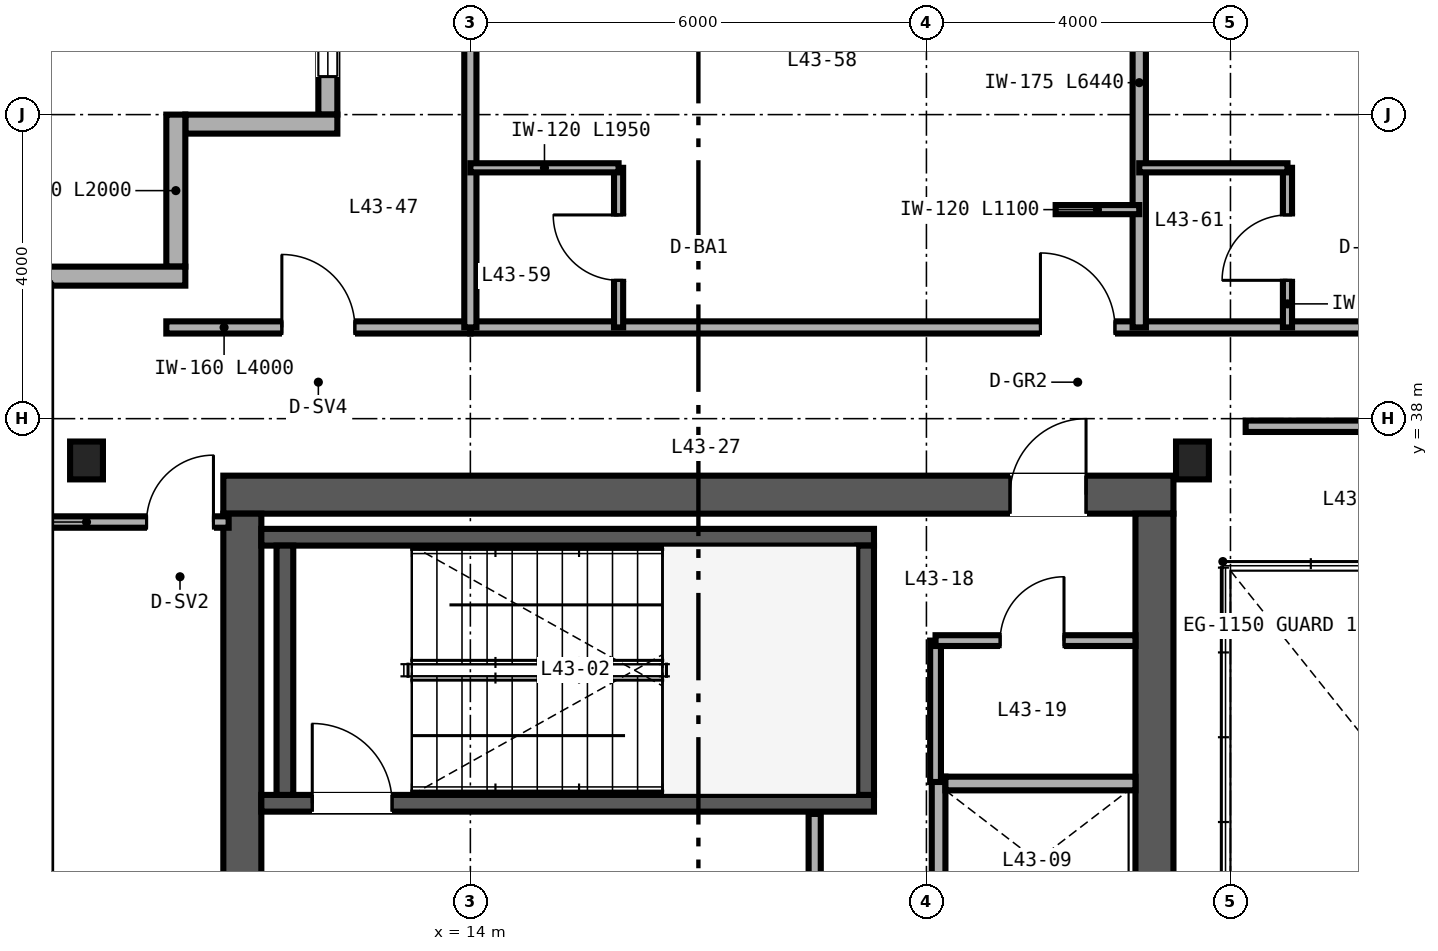
"""IFC4 building model, lengths in metres.
Left out: names, types, materials, properties, quantities, classifications, styles, units other than length and angle.
Written with IfcOpenShell. Run it as: python <this file> out.ifc"""

import sys

from ifc_helpers import new_model, si_unit, direction, frame, frame_2d, origin, origin_2d, place, context, subcontext, project, spatial, rectangle, i_section, extrude, source, transform, mapped, element, fill, save


model = new_model("IFC4")
c1 = context("Model", 3, precision=1e-05, world=origin(), true_north=direction((0.0, 1.0)))
c2 = subcontext(c1, "Body", "Model", "MODEL_VIEW")
j1 = project(units=[si_unit("LENGTHUNIT", "METRE"), si_unit("PLANEANGLEUNIT", "RADIAN")], contexts=[c1])
p1 = place(None, origin())
s1 = spatial("IfcSite", under=j1, at=p1, CompositionType="ELEMENT")
p2 = place(p1, origin())
s2 = spatial("IfcBuilding", under=s1, at=p2, CompositionType="ELEMENT")
p3 = place(p2, frame((0.0, 0.0, 174.0)))
s3 = spatial("IfcBuildingStorey", under=s2, at=p3, CompositionType="ELEMENT", Elevation=174.0)
p4 = place(p3, frame((10.75, 37.0, 0.0), z_axis=(0.0, 0.0, 1.0), x_axis=(1.0, 0.0, 0.0)))
e1 = element("IfcWall", 1, at=p4, inside=s3, PredefinedType="SHEAR", context=c2, shape_type="SweptSolid", body=[
    extrude(rectangle(XDim=12.5, YDim=0.5, at=frame_2d((6.25, 0.0))), origin(), (0.0, 0.0, 1.0), 3.37),
])
p5 = place(p4, frame((10.35, 0.0, 0.0)))
e2 = element("IfcOpeningElement", 2, at=p5, cuts=e1, PredefinedType="OPENING", context=c2, shape_type="SweptSolid", body=[
    extrude(rectangle(XDim=1.0, YDim=2.15, at=frame_2d((0.5, 1.075))), frame((0.0, 0.26, 0.0), z_axis=(0.0, -1.0, 0.0), x_axis=(1.0, 0.0, 0.0)), (0.0, 0.0, 1.0), 0.52),
])
for number, where, z_axis, x_axis in (
    (3, (11.0, 15.25, 0.0), (0.0, 0.0, 1.0), (0.0, 1.0, 0.0)),
    (4, (23.0, 15.25, 0.0), (0.0, 0.0, 1.0), (0.0, 1.0, 0.0)),
):
    element("IfcWall", number, at=place(p3, frame(where, z_axis=z_axis, x_axis=x_axis)), inside=s3, PredefinedType="SHEAR", context=c2, shape_type="SweptSolid", body=[
        extrude(rectangle(XDim=21.5, YDim=0.5, at=frame_2d((10.75, 0.0))), origin(), (0.0, 0.0, 1.0), 3.37),
    ])
p6 = place(p3, frame((11.25, 32.94, 0.0), z_axis=(0.0, 0.0, 1.0), x_axis=(1.0, 0.0, 0.0)))
e5 = element("IfcWall", 5, at=p6, inside=s3, PredefinedType="SHEAR", context=c2, shape_type="SweptSolid", body=[
    extrude(rectangle(XDim=8.06, YDim=0.22, at=frame_2d((4.03, 0.0))), origin(), (0.0, 0.0, 1.0), 3.4),
])
p7 = place(p6, frame((0.67, 0.0, 0.0)))
e6 = element("IfcOpeningElement", 6, at=p7, cuts=e5, PredefinedType="OPENING", context=c2, shape_type="SweptSolid", body=[
    extrude(rectangle(XDim=1.05, YDim=2.15, at=frame_2d((0.525, 1.075))), frame((0.0, 0.12, 0.0), z_axis=(0.0, -1.0, 0.0), x_axis=(1.0, 0.0, 0.0)), (0.0, 0.0, 1.0), 0.24),
])
p8 = place(p3, frame((11.25, 36.44, 0.0), z_axis=(0.0, 0.0, 1.0), x_axis=(1.0, 0.0, 0.0)))
e7 = element("IfcWall", 7, at=p8, inside=s3, PredefinedType="SHEAR", context=c2, shape_type="SweptSolid", body=[
    extrude(rectangle(XDim=8.06, YDim=0.22, at=frame_2d((4.03, 0.0))), origin(), (0.0, 0.0, 1.0), 3.4),
])
for number, where, z_axis, x_axis in (
    (8, (11.56, 33.05, 0.0), (0.0, 0.0, 1.0), (0.0, 1.0, 0.0)),
    (9, (19.2, 33.05, 0.0), (0.0, 0.0, 1.0), (0.0, 1.0, 0.0)),
):
    element("IfcWall", number, at=place(p3, frame(where, z_axis=z_axis, x_axis=x_axis)), inside=s3, PredefinedType="SHEAR", context=c2, shape_type="SweptSolid", body=[
        extrude(rectangle(XDim=3.28, YDim=0.22, at=frame_2d((1.64, 0.0))), origin(), (0.0, 0.0, 1.0), 3.4),
    ])
m1 = source(origin(), c2, "Body", "SweptSolid", [
    extrude(i_section(OverallWidth=0.432, OverallDepth=0.498, WebThickness=0.056, FlangeThickness=0.089, FilletRadius=0.025, at=origin_2d()), origin(), (0.0, 0.0, 1.0), 3.37),
])
for number, where, z_axis, x_axis in (
    (10, (8.95, 37.45, 0.0), (0.0, 0.0, 1.0), (1.0, 0.0, 0.0)),
    (11, (23.5, 37.45, 0.0), (0.0, 0.0, 1.0), (1.0, 0.0, 0.0)),
):
    element("IfcColumn", number, at=place(p3, frame(where, z_axis=z_axis, x_axis=x_axis)), inside=s3, PredefinedType="COLUMN", context=c2, shape_type="MappedRepresentation", body=[
        mapped(m1, transform((0.0, 0.0, 0.0), scale=1.0)),
    ])
p9 = place(p3, frame((12.125, 44.0, 0.0), z_axis=(0.0, 0.0, 1.0), x_axis=(0.0, -1.0, 0.0)))
e12 = element("IfcWall", 12, at=p9, inside=s3, PredefinedType="SOLIDWALL", context=c2, shape_type="SweptSolid", body=[
    extrude(rectangle(XDim=2.0, YDim=0.25, at=frame_2d((1.0, 0.0))), origin(), (0.0, 0.0, 1.0), 3.37),
])
p10 = place(p9, frame((0.5, 0.0, 0.85)))
e13 = element("IfcOpeningElement", 13, at=p10, cuts=e12, PredefinedType="OPENING", context=c2, shape_type="SweptSolid", body=[
    extrude(rectangle(XDim=1.0, YDim=1.9, at=frame_2d((0.5, 0.95))), frame((0.0, 0.135, 0.0), z_axis=(0.0, -1.0, 0.0), x_axis=(1.0, 0.0, 0.0)), (0.0, 0.0, 1.0), 0.27),
])
for number, where, z_axis, x_axis in (
    (14, (12.25, 41.875, 0.0), (0.0, 0.0, 1.0), (-1.0, 0.0, 0.0)),
    (15, (10.125, 42.0, 0.0), (0.0, 0.0, 1.0), (0.0, -1.0, 0.0)),
):
    element("IfcWall", number, at=place(p3, frame(where, z_axis=z_axis, x_axis=x_axis)), inside=s3, PredefinedType="SOLIDWALL", context=c2, shape_type="SweptSolid", body=[
        extrude(rectangle(XDim=2.0, YDim=0.25, at=frame_2d((1.0, 0.0))), origin(), (0.0, 0.0, 1.0), 3.37),
    ])
p11 = place(p3, frame((10.25, 39.875, 0.0), z_axis=(0.0, 0.0, 1.0), x_axis=(-1.0, 0.0, 0.0)))
e16 = element("IfcWall", 16, at=p11, inside=s3, PredefinedType="SOLIDWALL", context=c2, shape_type="SweptSolid", body=[
    extrude(rectangle(XDim=2.25, YDim=0.25, at=frame_2d((1.125, 0.0))), origin(), (0.0, 0.0, 1.0), 3.37),
])
p12 = place(p3, frame((20.16, 29.0, 0.0), z_axis=(0.0, 0.0, 1.0), x_axis=(0.0, 1.0, 0.0)))
e17 = element("IfcWall", 17, at=p12, inside=s3, PredefinedType="SOLIDWALL", context=c2, shape_type="SweptSolid", body=[
    extrude(rectangle(XDim=4.29, YDim=0.18, at=frame_2d((2.145, 0.0))), origin(), (0.0, 0.0, 1.0), 3.37),
])
p13 = place(p3, frame((20.25, 33.2, 0.0), z_axis=(0.0, 0.0, 1.0), x_axis=(1.0, 0.0, 0.0)))
e18 = element("IfcWall", 18, at=p13, inside=s3, PredefinedType="SOLIDWALL", context=c2, shape_type="SweptSolid", body=[
    extrude(rectangle(XDim=2.5, YDim=0.18, at=frame_2d((1.25, 0.0))), origin(), (0.0, 0.0, 1.0), 3.37),
])
p14 = place(p3, frame((18.53, 28.9, 0.0), z_axis=(0.0, 0.0, 1.0), x_axis=(0.0, 1.0, 0.0)))
e19 = element("IfcWall", 19, at=p14, inside=s3, PredefinedType="PARTITIONING", context=c2, shape_type="SweptSolid", body=[
    extrude(rectangle(XDim=3.9, YDim=0.16, at=frame_2d((1.95, 0.0))), origin(), (0.0, 0.0, 1.0), 3.37),
])
p15 = place(p14, frame((1.5, 0.0, 0.0)))
e20 = element("IfcOpeningElement", 20, at=p15, cuts=e19, PredefinedType="OPENING", context=c2, shape_type="SweptSolid", body=[
    extrude(rectangle(XDim=1.0, YDim=2.15, at=frame_2d((0.5, 1.075))), frame((0.0, 0.09, 0.0), z_axis=(0.0, -1.0, 0.0), x_axis=(1.0, 0.0, 0.0)), (0.0, 0.0, 1.0), 0.18),
])
p16 = place(p3, frame((20.12, 33.22, 0.0), z_axis=(0.0, 0.0, 1.0), x_axis=(0.0, 1.0, 0.0)))
e21 = element("IfcWall", 21, at=p16, inside=s3, PredefinedType="PARTITIONING", context=c2, shape_type="SweptSolid", body=[
    extrude(rectangle(XDim=1.86, YDim=0.142, at=frame_2d((0.93, 0.0))), origin(), (0.0, 0.0, 1.0), 3.37),
])
p17 = place(p3, frame((20.12, 35.08, 0.0), z_axis=(0.0, 0.0, 1.0), x_axis=(1.0, 0.0, 0.0)))
e22 = element("IfcWall", 22, at=p17, inside=s3, PredefinedType="PARTITIONING", context=c2, shape_type="SweptSolid", body=[
    extrude(rectangle(XDim=2.63, YDim=0.142, at=frame_2d((1.315, 0.0))), origin(), (0.0, 0.0, 1.0), 3.37),
])
p18 = place(p17, frame((0.85, 0.0, 0.0)))
e23 = element("IfcOpeningElement", 23, at=p18, cuts=e22, PredefinedType="OPENING", context=c2, shape_type="SweptSolid", body=[
    extrude(rectangle(XDim=0.84, YDim=2.1, at=frame_2d((0.42, 1.05))), frame((0.0, 0.081, 0.0), z_axis=(0.0, -1.0, 0.0), x_axis=(1.0, 0.0, 0.0)), (0.0, 0.0, 1.0), 0.162),
])
p19 = place(p3, frame((24.2, 37.9, 0.0), z_axis=(0.0, 0.0, 1.0), x_axis=(1.0, 0.0, 0.0)))
e24 = element("IfcWall", 24, at=p19, inside=s3, PredefinedType="PARTITIONING", context=c2, shape_type="SweptSolid", body=[
    extrude(rectangle(XDim=15.6, YDim=0.15, at=frame_2d((7.8, 0.0))), origin(), (0.0, 0.0, 1.0), 3.37),
])
p20 = place(p19, frame((3.0, 0.0, 0.0)))
e25 = element("IfcOpeningElement", 25, at=p20, cuts=e24, PredefinedType="OPENING", context=c2, shape_type="SweptSolid", body=[
    extrude(rectangle(XDim=0.9, YDim=2.15, at=frame_2d((0.45, 1.075))), frame((0.0, 0.085, 0.0), z_axis=(0.0, -1.0, 0.0), x_axis=(1.0, 0.0, 0.0)), (0.0, 0.0, 1.0), 0.17),
])
p21 = place(p19, frame((11.0, 0.0, 0.0)))
e26 = element("IfcOpeningElement", 26, at=p21, cuts=e24, PredefinedType="OPENING", context=c2, shape_type="SweptSolid", body=[
    extrude(rectangle(XDim=0.9, YDim=2.15, at=frame_2d((0.45, 1.075))), frame((0.0, 0.085, 0.0), z_axis=(0.0, -1.0, 0.0), x_axis=(1.0, 0.0, 0.0)), (0.0, 0.0, 1.0), 0.17),
])
p22 = place(p3, frame((8.16, 36.64, 0.0), z_axis=(0.0, 0.0, 1.0), x_axis=(1.0, 0.0, 0.0)))
e27 = element("IfcWall", 27, at=p22, inside=s3, PredefinedType="PARTITIONING", context=c2, shape_type="SweptSolid", body=[
    extrude(rectangle(XDim=2.66, YDim=0.15, at=frame_2d((1.33, 0.0))), origin(), (0.0, 0.0, 1.0), 2.753),
])
p23 = place(p22, frame((1.58, 0.0, 0.0)))
e28 = element("IfcOpeningElement", 28, at=p23, cuts=e27, PredefinedType="OPENING", context=c2, shape_type="SweptSolid", body=[
    extrude(rectangle(XDim=0.88, YDim=2.15, at=frame_2d((0.44, 1.075))), frame((0.0, 0.085, 0.0), z_axis=(0.0, -1.0, 0.0), x_axis=(1.0, 0.0, 0.0)), (0.0, 0.0, 1.0), 0.17),
])
p24 = place(p3, frame((10.0, 39.2, 0.0), z_axis=(0.0, 0.0, 1.0), x_axis=(1.0, 0.0, 0.0)))
e29 = element("IfcWall", 29, at=p24, inside=s3, PredefinedType="PARTITIONING", context=c2, shape_type="SweptSolid", body=[
    extrude(rectangle(XDim=4.0, YDim=0.16, at=frame_2d((2.0, 0.0))), origin(), (0.0, 0.0, 1.0), 3.37),
])
p25 = place(p24, frame((1.52, 0.0, 0.0)))
e30 = element("IfcOpeningElement", 30, at=p25, cuts=e29, PredefinedType="OPENING", context=c2, shape_type="SweptSolid", body=[
    extrude(rectangle(XDim=0.96, YDim=2.15, at=frame_2d((0.48, 1.075))), frame((0.0, 0.09, 0.0), z_axis=(0.0, -1.0, 0.0), x_axis=(1.0, 0.0, 0.0)), (0.0, 0.0, 1.0), 0.18),
])
p26 = place(p3, frame((14.0, 39.2, 0.0), z_axis=(0.0, 0.0, 1.0), x_axis=(1.0, 0.0, 0.0)))
e31 = element("IfcWall", 31, at=p26, inside=s3, PredefinedType="PARTITIONING", context=c2, shape_type="SweptSolid", body=[
    extrude(rectangle(XDim=36.0, YDim=0.16, at=frame_2d((18.0, 0.0))), origin(), (0.0, 0.0, 1.0), 2.913),
])
p27 = place(p26, frame((7.5, 0.0, 0.0)))
e32 = element("IfcOpeningElement", 32, at=p27, cuts=e31, PredefinedType="OPENING", context=c2, shape_type="SweptSolid", body=[
    extrude(rectangle(XDim=0.98, YDim=2.2, at=frame_2d((0.49, 1.1))), frame((0.0, 0.09, 0.0), z_axis=(0.0, -1.0, 0.0), x_axis=(1.0, 0.0, 0.0)), (0.0, 0.0, 1.0), 0.18),
])
p28 = place(p26, frame((16.5, 0.0, 0.0)))
e33 = element("IfcOpeningElement", 33, at=p28, cuts=e31, PredefinedType="OPENING", context=c2, shape_type="SweptSolid", body=[
    extrude(rectangle(XDim=0.98, YDim=2.2, at=frame_2d((0.49, 1.1))), frame((0.0, 0.09, 0.0), z_axis=(0.0, -1.0, 0.0), x_axis=(1.0, 0.0, 0.0)), (0.0, 0.0, 1.0), 0.18),
])
p29 = place(p26, frame((21.82, 0.0, 0.0)))
e34 = element("IfcOpeningElement", 34, at=p29, cuts=e31, PredefinedType="OPENING", context=c2, shape_type="SweptSolid", body=[
    extrude(rectangle(XDim=0.96, YDim=2.15, at=frame_2d((0.48, 1.075))), frame((0.0, 0.09, 0.0), z_axis=(0.0, -1.0, 0.0), x_axis=(1.0, 0.0, 0.0)), (0.0, 0.0, 1.0), 0.18),
])
p30 = place(p26, frame((30.14, 0.0, 0.0)))
e35 = element("IfcOpeningElement", 35, at=p30, cuts=e31, PredefinedType="OPENING", context=c2, shape_type="SweptSolid", body=[
    extrude(rectangle(XDim=0.94, YDim=2.15, at=frame_2d((0.47, 1.075))), frame((0.0, 0.09, 0.0), z_axis=(0.0, -1.0, 0.0), x_axis=(1.0, 0.0, 0.0)), (0.0, 0.0, 1.0), 0.18),
])
p31 = place(p26, frame((34.74, 0.0, 0.0)))
e36 = element("IfcOpeningElement", 36, at=p31, cuts=e31, PredefinedType="OPENING", context=c2, shape_type="SweptSolid", body=[
    extrude(rectangle(XDim=0.94, YDim=2.15, at=frame_2d((0.47, 1.075))), frame((0.0, 0.09, 0.0), z_axis=(0.0, -1.0, 0.0), x_axis=(1.0, 0.0, 0.0)), (0.0, 0.0, 1.0), 0.18),
])
p32 = place(p3, frame((14.0, 39.2, 0.0), z_axis=(0.0, 0.0, 1.0), x_axis=(0.0, 1.0, 0.0)))
e37 = element("IfcWall", 37, at=p32, inside=s3, PredefinedType="PARTITIONING", context=c2, shape_type="SweptSolid", body=[
    extrude(rectangle(XDim=6.44, YDim=0.16, at=frame_2d((3.22, 0.0))), origin(), (0.0, 0.0, 1.0), 2.677),
])
p33 = place(p3, frame((22.8, 39.2, 0.0), z_axis=(0.0, 0.0, 1.0), x_axis=(0.0, 1.0, 0.0)))
e38 = element("IfcWall", 38, at=p33, inside=s3, PredefinedType="PARTITIONING", context=c2, shape_type="SweptSolid", body=[
    extrude(rectangle(XDim=6.44, YDim=0.175, at=frame_2d((3.22, 0.0))), origin(), (0.0, 0.0, 1.0), 2.833),
])
p34 = place(p3, frame((15.95, 39.2, 0.0), z_axis=(0.0, 0.0, 1.0), x_axis=(0.0, 1.0, 0.0)))
e39 = element("IfcWall", 39, at=p34, inside=s3, PredefinedType="PARTITIONING", context=c2, shape_type="SweptSolid", body=[
    extrude(rectangle(XDim=2.1, YDim=0.12, at=frame_2d((1.05, 0.0))), origin(), (0.0, 0.0, 1.0), 3.37),
])
p35 = place(p34, frame((0.62, 0.0, 0.0)))
e40 = element("IfcOpeningElement", 40, at=p35, cuts=e39, PredefinedType="OPENING", context=c2, shape_type="SweptSolid", body=[
    extrude(rectangle(XDim=0.86, YDim=2.1, at=frame_2d((0.43, 1.05))), frame((0.0, 0.07, 0.0), z_axis=(0.0, -1.0, 0.0), x_axis=(1.0, 0.0, 0.0)), (0.0, 0.0, 1.0), 0.14),
])
p36 = place(p3, frame((14.0, 41.3, 0.0), z_axis=(0.0, 0.0, 1.0), x_axis=(1.0, 0.0, 0.0)))
e41 = element("IfcWall", 41, at=p36, inside=s3, PredefinedType="PARTITIONING", context=c2, shape_type="SweptSolid", body=[
    extrude(rectangle(XDim=1.95, YDim=0.12, at=frame_2d((0.975, 0.0))), origin(), (0.0, 0.0, 1.0), 3.37),
])
p37 = place(p3, frame((21.7, 40.75, 0.0), z_axis=(0.0, 0.0, 1.0), x_axis=(1.0, 0.0, 0.0)))
e42 = element("IfcWall", 42, at=p37, inside=s3, PredefinedType="PARTITIONING", context=c2, shape_type="SweptSolid", body=[
    extrude(rectangle(XDim=1.1, YDim=0.12, at=frame_2d((0.55, 0.0))), origin(), (0.0, 0.0, 1.0), 3.37),
])
p38 = place(p3, frame((24.75, 39.2, 0.0), z_axis=(0.0, 0.0, 1.0), x_axis=(0.0, 1.0, 0.0)))
e43 = element("IfcWall", 43, at=p38, inside=s3, PredefinedType="PARTITIONING", context=c2, shape_type="SweptSolid", body=[
    extrude(rectangle(XDim=2.1, YDim=0.12, at=frame_2d((1.05, 0.0))), origin(), (0.0, 0.0, 1.0), 3.37),
])
p39 = place(p38, frame((0.62, 0.0, 0.0)))
e44 = element("IfcOpeningElement", 44, at=p39, cuts=e43, PredefinedType="OPENING", context=c2, shape_type="SweptSolid", body=[
    extrude(rectangle(XDim=0.86, YDim=2.1, at=frame_2d((0.43, 1.05))), frame((0.0, 0.07, 0.0), z_axis=(0.0, -1.0, 0.0), x_axis=(1.0, 0.0, 0.0)), (0.0, 0.0, 1.0), 0.14),
])
p40 = place(p3, frame((22.8, 41.3, 0.0), z_axis=(0.0, 0.0, 1.0), x_axis=(1.0, 0.0, 0.0)))
e45 = element("IfcWall", 45, at=p40, inside=s3, PredefinedType="PARTITIONING", context=c2, shape_type="SweptSolid", body=[
    extrude(rectangle(XDim=1.95, YDim=0.12, at=frame_2d((0.975, 0.0))), origin(), (0.0, 0.0, 1.0), 2.913),
])
m2 = source(origin(), c2, "Body", "SweptSolid", [
    extrude(rectangle(XDim=1.0, YDim=1.9, at=frame_2d((0.5, 0.95))), frame((0.0, 0.03, 0.0), z_axis=(0.0, -1.0, 0.0), x_axis=(1.0, 0.0, 0.0)), (0.0, 0.0, 1.0), 0.06),
])
p41 = place(p10, origin())
e46 = element("IfcWindow", 46, at=p41, inside=s3, PartitioningType="SINGLE_PANEL", PredefinedType="WINDOW", context=c2, shape_type="MappedRepresentation", body=[
    mapped(m2, transform((0.0, 0.0, 0.0), scale=1.0)),
])
fill(e13, e46)
m3 = source(origin(), c2, "Body", "SweptSolid", [
    extrude(rectangle(XDim=1.05, YDim=2.15, at=frame_2d((0.525, 1.075))), frame((0.0, 0.025, 0.0), z_axis=(0.0, -1.0, 0.0), x_axis=(1.0, 0.0, 0.0)), (0.0, 0.0, 1.0), 0.05),
])
p42 = place(p7, origin())
e47 = element("IfcDoor", 47, at=p42, inside=s3, OperationType="SINGLE_SWING_LEFT", PredefinedType="DOOR", context=c2, shape_type="MappedRepresentation", body=[
    mapped(m3, transform((0.0, 0.0, 0.0), scale=1.0)),
])
fill(e6, e47)
m4 = source(origin(), c2, "Body", "SweptSolid", [
    extrude(rectangle(XDim=0.84, YDim=2.1, at=frame_2d((0.42, 1.05))), frame((0.0, 0.025, 0.0), z_axis=(0.0, -1.0, 0.0), x_axis=(1.0, 0.0, 0.0)), (0.0, 0.0, 1.0), 0.05),
])
p43 = place(p18, origin())
e48 = element("IfcDoor", 48, at=p43, inside=s3, OperationType="SINGLE_SWING_RIGHT", PredefinedType="DOOR", context=c2, shape_type="MappedRepresentation", body=[
    mapped(m4, transform((0.0, 0.0, 0.0), scale=1.0)),
])
fill(e23, e48)
m5 = source(origin(), c2, "Body", "SweptSolid", [
    extrude(rectangle(XDim=1.0, YDim=2.15, at=frame_2d((0.5, 1.075))), frame((0.0, 0.025, 0.0), z_axis=(0.0, -1.0, 0.0), x_axis=(1.0, 0.0, 0.0)), (0.0, 0.0, 1.0), 0.05),
])
p44 = place(p5, origin())
e49 = element("IfcDoor", 49, at=p44, inside=s3, OperationType="SINGLE_SWING_RIGHT", PredefinedType="DOOR", context=c2, shape_type="MappedRepresentation", body=[
    mapped(m5, transform((0.0, 0.0, 0.0), scale=1.0)),
])
fill(e2, e49)
m6 = source(origin(), c2, "Body", "SweptSolid", [
    extrude(rectangle(XDim=0.88, YDim=2.15, at=frame_2d((0.44, 1.075))), frame((0.0, 0.025, 0.0), z_axis=(0.0, -1.0, 0.0), x_axis=(1.0, 0.0, 0.0)), (0.0, 0.0, 1.0), 0.05),
])
p45 = place(p23, origin())
e50 = element("IfcDoor", 50, at=p45, inside=s3, OperationType="SINGLE_SWING_RIGHT", PredefinedType="DOOR", context=c2, shape_type="MappedRepresentation", body=[
    mapped(m6, transform((0.0, 0.0, 0.0), scale=1.0)),
])
fill(e28, e50)
m7 = source(origin(), c2, "Body", "SweptSolid", [
    extrude(rectangle(XDim=0.96, YDim=2.15, at=frame_2d((0.48, 1.075))), frame((0.0, 0.025, 0.0), z_axis=(0.0, -1.0, 0.0), x_axis=(1.0, 0.0, 0.0)), (0.0, 0.0, 1.0), 0.05),
])
p46 = place(p25, origin())
e51 = element("IfcDoor", 51, at=p46, inside=s3, OperationType="SINGLE_SWING_LEFT", PredefinedType="DOOR", context=c2, shape_type="MappedRepresentation", body=[
    mapped(m7, transform((0.0, 0.0, 0.0), scale=1.0)),
])
fill(e30, e51)
m8 = source(origin(), c2, "Body", "SweptSolid", [
    extrude(rectangle(XDim=0.86, YDim=2.1, at=frame_2d((0.43, 1.05))), frame((0.0, 0.025, 0.0), z_axis=(0.0, -1.0, 0.0), x_axis=(1.0, 0.0, 0.0)), (0.0, 0.0, 1.0), 0.05),
])
p47 = place(p35, origin())
e52 = element("IfcDoor", 52, at=p47, inside=s3, OperationType="SINGLE_SWING_RIGHT", PredefinedType="DOOR", context=c2, shape_type="MappedRepresentation", body=[
    mapped(m8, transform((0.0, 0.0, 0.0), scale=1.0)),
])
fill(e40, e52)
p48 = place(p39, origin())
e53 = element("IfcDoor", 53, at=p48, inside=s3, OperationType="SINGLE_SWING_LEFT", PredefinedType="DOOR", context=c2, shape_type="MappedRepresentation", body=[
    mapped(m8, transform((0.0, 0.0, 0.0), scale=1.0)),
])
fill(e44, e53)
m9 = source(origin(), c2, "Body", "SweptSolid", [
    extrude(rectangle(XDim=0.98, YDim=2.2, at=frame_2d((0.49, 1.1))), frame((0.0, 0.025, 0.0), z_axis=(0.0, -1.0, 0.0), x_axis=(1.0, 0.0, 0.0)), (0.0, 0.0, 1.0), 0.05),
])
p49 = place(p27, origin())
e54 = element("IfcDoor", 54, at=p49, inside=s3, OperationType="SINGLE_SWING_LEFT", PredefinedType="DOOR", context=c2, shape_type="MappedRepresentation", body=[
    mapped(m9, transform((0.0, 0.0, 0.0), scale=1.0)),
])
fill(e32, e54)
save(model, sys.argv[1])
